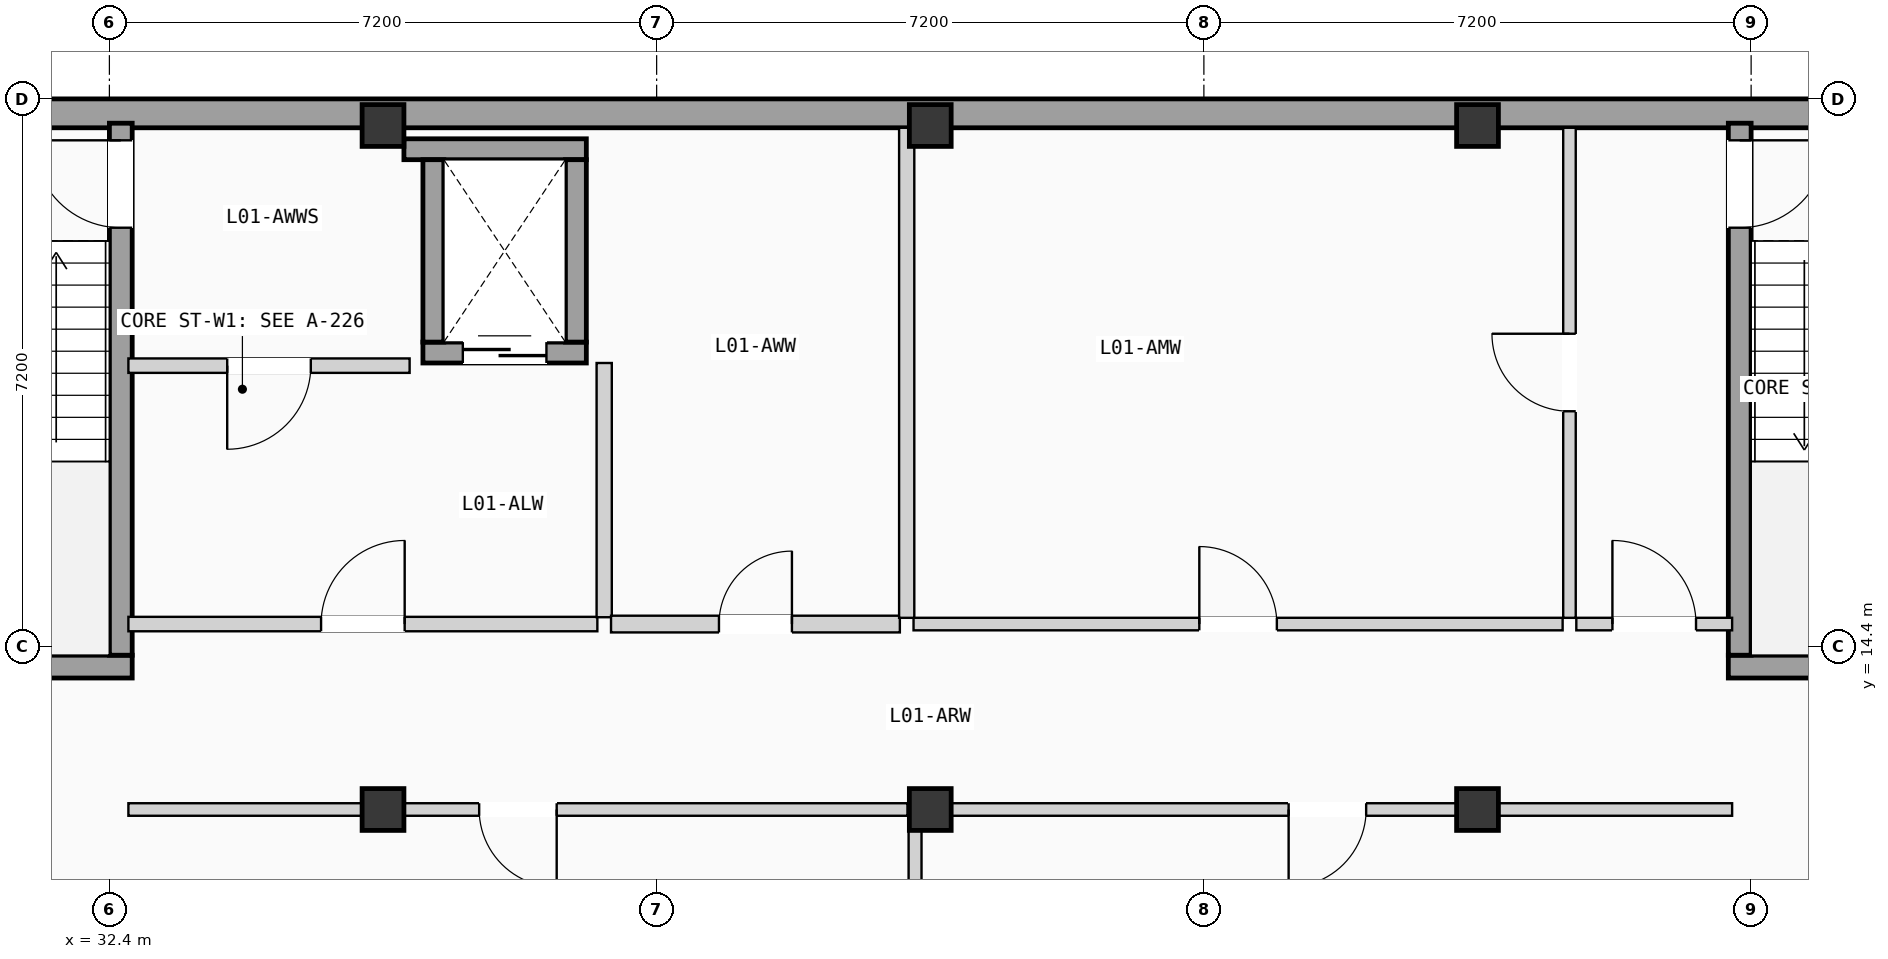
"""IFC4 building model, lengths in metres.
Left out: names, types, materials, properties, quantities, classifications, styles, units other than length and angle.
Written with IfcOpenShell. Run it as: python <this file> out.ifc"""

import sys

from ifc_helpers import new_model, si_unit, direction, frame, frame_2d, origin, origin_2d, place, context, subcontext, project, spatial, rectangle, extrude, element, fill, save


model = new_model("IFC4")
c1 = context("Model", 3, precision=1e-05, world=origin(), true_north=direction((0.0, 1.0)))
c2 = subcontext(c1, "Body", "Model", "MODEL_VIEW")
j1 = project(units=[si_unit("LENGTHUNIT", "METRE"), si_unit("PLANEANGLEUNIT", "RADIAN")], contexts=[c1])
p1 = place(None, origin())
s1 = spatial("IfcSite", under=j1, at=p1, CompositionType="ELEMENT")
p2 = place(p1, origin())
s2 = spatial("IfcBuilding", under=s1, at=p2, CompositionType="ELEMENT")
p3 = place(p2, frame((0.0, 0.0, 4.9)))
s3 = spatial("IfcBuildingStorey", under=s2, at=p3, CompositionType="ELEMENT", Elevation=4.9)
for number, where, z_axis, x_axis in (
    (1, (36.0, 12.25, 0.0), (0.0, 0.0, 1.0), (1.0, 0.0, 0.0)),
    (2, (36.0, 21.25, 0.0), (0.0, 0.0, 1.0), (1.0, 0.0, 0.0)),
    (3, (43.2, 12.25, 0.0), (0.0, 0.0, 1.0), (1.0, 0.0, 0.0)),
    (4, (43.2, 21.25, 0.0), (0.0, 0.0, 1.0), (1.0, 0.0, 0.0)),
    (5, (50.4, 12.25, 0.0), (0.0, 0.0, 1.0), (1.0, 0.0, 0.0)),
    (6, (50.4, 21.25, 0.0), (0.0, 0.0, 1.0), (1.0, 0.0, 0.0)),
):
    element("IfcColumn", number, at=place(p3, frame(where, z_axis=z_axis, x_axis=x_axis)), inside=s3, PredefinedType="COLUMN", context=c2, shape_type="SweptSolid", body=[
        extrude(rectangle(XDim=0.55, YDim=0.55, at=origin_2d()), origin(), (0.0, 0.0, 1.0), 3.675),
    ])
p4 = place(p3, frame((28.8, 21.41, 0.0), z_axis=(0.0, 0.0, 1.0), x_axis=(1.0, 0.0, 0.0)))
e7 = element("IfcWall", 7, at=p4, inside=s3, PredefinedType="SOLIDWALL", context=c2, shape_type="SweptSolid", body=[
    extrude(rectangle(XDim=28.8, YDim=0.38, at=frame_2d((14.4, 0.0))), origin(), (0.0, 0.0, 1.0), 3.4),
])
p5 = place(p3, frame((29.1, 14.13, 0.0), z_axis=(0.0, 0.0, 1.0), x_axis=(1.0, 0.0, 0.0)))
e8 = element("IfcWall", 8, at=p5, inside=s3, PredefinedType="SHEAR", context=c2, shape_type="SweptSolid", body=[
    extrude(rectangle(XDim=3.6, YDim=0.3, at=frame_2d((1.8, 0.0))), origin(), (0.0, 0.0, 1.0), 3.4),
])
p6 = place(p3, frame((32.55, 14.28, 0.0), z_axis=(0.0, 0.0, 1.0), x_axis=(0.0, 1.0, 0.0)))
e9 = element("IfcWall", 9, at=p6, inside=s3, PredefinedType="SHEAR", context=c2, shape_type="SweptSolid", body=[
    extrude(rectangle(XDim=7.0, YDim=0.3, at=frame_2d((3.5, 0.0))), origin(), (0.0, 0.0, 1.0), 3.4),
])
p7 = place(p6, frame((5.625, 0.0, 0.0)))
e10 = element("IfcOpeningElement", 10, at=p7, cuts=e9, PredefinedType="OPENING", context=c2, shape_type="SweptSolid", body=[
    extrude(rectangle(XDim=1.15, YDim=2.12, at=frame_2d((0.575, 1.06))), frame((0.0, 0.16, 0.0), z_axis=(0.0, -1.0, 0.0), x_axis=(1.0, 0.0, 0.0)), (0.0, 0.0, 1.0), 0.32),
])
p8 = place(p3, frame((53.7, 14.13, 0.0), z_axis=(0.0, 0.0, 1.0), x_axis=(1.0, 0.0, 0.0)))
e11 = element("IfcWall", 11, at=p8, inside=s3, PredefinedType="SHEAR", context=c2, shape_type="SweptSolid", body=[
    extrude(rectangle(XDim=3.6, YDim=0.3, at=frame_2d((1.8, 0.0))), origin(), (0.0, 0.0, 1.0), 3.4),
])
p9 = place(p3, frame((53.85, 14.28, 0.0), z_axis=(0.0, 0.0, 1.0), x_axis=(0.0, 1.0, 0.0)))
e12 = element("IfcWall", 12, at=p9, inside=s3, PredefinedType="SHEAR", context=c2, shape_type="SweptSolid", body=[
    extrude(rectangle(XDim=7.0, YDim=0.3, at=frame_2d((3.5, 0.0))), origin(), (0.0, 0.0, 1.0), 3.4),
])
p10 = place(p9, frame((5.625, 0.0, 0.0)))
e13 = element("IfcOpeningElement", 13, at=p10, cuts=e12, PredefinedType="OPENING", context=c2, shape_type="SweptSolid", body=[
    extrude(rectangle(XDim=1.15, YDim=2.12, at=frame_2d((0.575, 1.06))), frame((0.0, 0.16, 0.0), z_axis=(0.0, -1.0, 0.0), x_axis=(1.0, 0.0, 0.0)), (0.0, 0.0, 1.0), 0.32),
])
p11 = place(p3, frame((36.525, 18.262, 0.0), z_axis=(0.0, 0.0, 1.0), x_axis=(1.0, 0.0, 0.0)))
e14 = element("IfcWall", 14, at=p11, inside=s3, PredefinedType="SHEAR", context=c2, shape_type="SweptSolid", body=[
    extrude(rectangle(XDim=2.15, YDim=0.275, at=frame_2d((1.075, 0.0))), origin(), (0.0, 0.0, 1.0), 3.4),
])
p12 = place(p11, frame((0.525, 0.0, 0.0)))
e15 = element("IfcOpeningElement", 15, at=p12, cuts=e14, PredefinedType="OPENING", context=c2, shape_type="SweptSolid", body=[
    extrude(rectangle(XDim=1.1, YDim=2.15, at=frame_2d((0.55, 1.075))), frame((0.0, 0.147, 0.0), z_axis=(0.0, -1.0, 0.0), x_axis=(1.0, 0.0, 0.0)), (0.0, 0.0, 1.0), 0.295),
])
for number, where, z_axis, x_axis in (
    (16, (36.275, 20.938, 0.0), (0.0, 0.0, 1.0), (1.0, 0.0, 0.0)),
    (17, (36.663, 18.4, 0.0), (0.0, 0.0, 1.0), (0.0, 1.0, 0.0)),
    (18, (38.538, 18.4, 0.0), (0.0, 0.0, 1.0), (0.0, 1.0, 0.0)),
):
    element("IfcWall", number, at=place(p3, frame(where, z_axis=z_axis, x_axis=x_axis)), inside=s3, PredefinedType="SHEAR", context=c2, shape_type="SweptSolid", body=[
        extrude(rectangle(XDim=2.4, YDim=0.275, at=frame_2d((1.2, 0.0))), origin(), (0.0, 0.0, 1.0), 3.4),
    ])
p13 = place(p3, frame((32.65, 18.09, 0.0), z_axis=(0.0, 0.0, 1.0), x_axis=(1.0, 0.0, 0.0)))
e19 = element("IfcWall", 19, at=p13, inside=s3, PredefinedType="PARTITIONING", context=c2, shape_type="SweptSolid", body=[
    extrude(rectangle(XDim=3.7, YDim=0.19, at=frame_2d((1.85, 0.0))), origin(), (0.0, 0.0, 1.0), 3.39),
])
p14 = place(p13, frame((1.3, 0.0, 0.0)))
e20 = element("IfcOpeningElement", 20, at=p14, cuts=e19, PredefinedType="OPENING", context=c2, shape_type="SweptSolid", body=[
    extrude(rectangle(XDim=1.1, YDim=2.12, at=frame_2d((0.55, 1.06))), frame((0.0, 0.105, 0.0), z_axis=(0.0, -1.0, 0.0), x_axis=(1.0, 0.0, 0.0)), (0.0, 0.0, 1.0), 0.21),
])
p15 = place(p3, frame((32.65, 14.69, 0.0), z_axis=(0.0, 0.0, 1.0), x_axis=(1.0, 0.0, 0.0)))
e21 = element("IfcWall", 21, at=p15, inside=s3, PredefinedType="PARTITIONING", context=c2, shape_type="SweptSolid", body=[
    extrude(rectangle(XDim=6.17, YDim=0.19, at=frame_2d((3.085, 0.0))), origin(), (0.0, 0.0, 1.0), 3.39),
])
p16 = place(p15, frame((2.535, 0.0, 0.0)))
e22 = element("IfcOpeningElement", 22, at=p16, cuts=e21, PredefinedType="OPENING", context=c2, shape_type="SweptSolid", body=[
    extrude(rectangle(XDim=1.1, YDim=2.12, at=frame_2d((0.55, 1.06))), frame((0.0, 0.105, 0.0), z_axis=(0.0, -1.0, 0.0), x_axis=(1.0, 0.0, 0.0)), (0.0, 0.0, 1.0), 0.21),
])
p17 = place(p3, frame((38.91, 14.78, 0.0), z_axis=(0.0, 0.0, 1.0), x_axis=(0.0, 1.0, 0.0)))
e23 = element("IfcWall", 23, at=p17, inside=s3, PredefinedType="PLUMBINGWALL", context=c2, shape_type="SweptSolid", body=[
    extrude(rectangle(XDim=3.345, YDim=0.2, at=frame_2d((1.672, 0.0))), origin(), (0.0, 0.0, 1.0), 3.39),
])
p18 = place(p3, frame((51.7, 14.69, 0.0), z_axis=(0.0, 0.0, 1.0), x_axis=(1.0, 0.0, 0.0)))
e24 = element("IfcWall", 24, at=p18, inside=s3, PredefinedType="PARTITIONING", context=c2, shape_type="SweptSolid", body=[
    extrude(rectangle(XDim=2.05, YDim=0.165, at=frame_2d((1.025, 0.0))), origin(), (0.0, 0.0, 1.0), 3.39),
])
p19 = place(p18, frame((0.475, 0.0, 0.0)))
e25 = element("IfcOpeningElement", 25, at=p19, cuts=e24, PredefinedType="OPENING", context=c2, shape_type="SweptSolid", body=[
    extrude(rectangle(XDim=1.1, YDim=2.12, at=frame_2d((0.55, 1.06))), frame((0.0, 0.093, 0.0), z_axis=(0.0, -1.0, 0.0), x_axis=(1.0, 0.0, 0.0)), (0.0, 0.0, 1.0), 0.185),
])
p20 = place(p3, frame((32.65, 12.25, 0.0), z_axis=(0.0, 0.0, 1.0), x_axis=(1.0, 0.0, 0.0)))
e26 = element("IfcWall", 26, at=p20, inside=s3, PredefinedType="PARTITIONING", context=c2, shape_type="SweptSolid", body=[
    extrude(rectangle(XDim=10.25, YDim=0.165, at=frame_2d((5.125, 0.0))), origin(), (0.0, 0.0, 1.0), 2.72),
])
p21 = place(p20, frame((4.615, 0.0, 0.0)))
e27 = element("IfcOpeningElement", 27, at=p21, cuts=e26, PredefinedType="OPENING", context=c2, shape_type="SweptSolid", body=[
    extrude(rectangle(XDim=1.02, YDim=2.16, at=frame_2d((0.51, 1.08))), frame((0.0, 0.093, 0.0), z_axis=(0.0, -1.0, 0.0), x_axis=(1.0, 0.0, 0.0)), (0.0, 0.0, 1.0), 0.185),
])
p22 = place(p3, frame((43.1, 12.25, 0.0), z_axis=(0.0, 0.0, 1.0), x_axis=(1.0, 0.0, 0.0)))
e28 = element("IfcWall", 28, at=p22, inside=s3, PredefinedType="PARTITIONING", context=c2, shape_type="SweptSolid", body=[
    extrude(rectangle(XDim=10.65, YDim=0.165, at=frame_2d((5.325, 0.0))), origin(), (0.0, 0.0, 1.0), 2.72),
])
p23 = place(p22, frame((4.815, 0.0, 0.0)))
e29 = element("IfcOpeningElement", 29, at=p23, cuts=e28, PredefinedType="OPENING", context=c2, shape_type="SweptSolid", body=[
    extrude(rectangle(XDim=1.02, YDim=2.16, at=frame_2d((0.51, 1.08))), frame((0.0, 0.093, 0.0), z_axis=(0.0, -1.0, 0.0), x_axis=(1.0, 0.0, 0.0)), (0.0, 0.0, 1.0), 0.185),
])
p24 = place(p3, frame((39.0, 14.69, 0.0), z_axis=(0.0, 0.0, 1.0), x_axis=(1.0, 0.0, 0.0)))
e30 = element("IfcWall", 30, at=p24, inside=s3, PredefinedType="PLUMBINGWALL", context=c2, shape_type="SweptSolid", body=[
    extrude(rectangle(XDim=3.8, YDim=0.22, at=frame_2d((1.9, 0.0))), origin(), (0.0, 0.0, 1.0), 3.39),
])
p25 = place(p24, frame((1.42, 0.0, 0.0)))
e31 = element("IfcOpeningElement", 31, at=p25, cuts=e30, PredefinedType="OPENING", context=c2, shape_type="SweptSolid", body=[
    extrude(rectangle(XDim=0.96, YDim=2.05, at=frame_2d((0.48, 1.025))), frame((0.0, 0.12, 0.0), z_axis=(0.0, -1.0, 0.0), x_axis=(1.0, 0.0, 0.0)), (0.0, 0.0, 1.0), 0.24),
])
p26 = place(p3, frame((42.98, 14.69, 0.0), z_axis=(0.0, 0.0, 1.0), x_axis=(1.0, 0.0, 0.0)))
e32 = element("IfcWall", 32, at=p26, inside=s3, PredefinedType="PARTITIONING", context=c2, shape_type="SweptSolid", body=[
    extrude(rectangle(XDim=8.54, YDim=0.165, at=frame_2d((4.27, 0.0))), origin(), (0.0, 0.0, 1.0), 3.39),
])
p27 = place(p26, frame((3.76, 0.0, 0.0)))
e33 = element("IfcOpeningElement", 33, at=p27, cuts=e32, PredefinedType="OPENING", context=c2, shape_type="SweptSolid", body=[
    extrude(rectangle(XDim=1.02, YDim=2.16, at=frame_2d((0.51, 1.08))), frame((0.0, 0.093, 0.0), z_axis=(0.0, -1.0, 0.0), x_axis=(1.0, 0.0, 0.0)), (0.0, 0.0, 1.0), 0.185),
])
p28 = place(p3, frame((51.61, 14.772, 0.0), z_axis=(0.0, 0.0, 1.0), x_axis=(0.0, 1.0, 0.0)))
e34 = element("IfcWall", 34, at=p28, inside=s3, PredefinedType="PARTITIONING", context=c2, shape_type="SweptSolid", body=[
    extrude(rectangle(XDim=6.448, YDim=0.165, at=frame_2d((3.224, 0.0))), origin(), (0.0, 0.0, 1.0), 3.39),
])
p29 = place(p28, frame((2.718, 0.0, 0.0)))
e35 = element("IfcOpeningElement", 35, at=p29, cuts=e34, PredefinedType="OPENING", context=c2, shape_type="SweptSolid", body=[
    extrude(rectangle(XDim=1.02, YDim=2.16, at=frame_2d((0.51, 1.08))), frame((0.0, 0.093, 0.0), z_axis=(0.0, -1.0, 0.0), x_axis=(1.0, 0.0, 0.0)), (0.0, 0.0, 1.0), 0.185),
])
p30 = place(p3, frame((43.0, 0.38, 0.0), z_axis=(0.0, 0.0, 1.0), x_axis=(0.0, 1.0, 0.0)))
e36 = element("IfcWall", 36, at=p30, inside=s3, PredefinedType="PARTITIONING", context=c2, shape_type="SweptSolid", body=[
    extrude(rectangle(XDim=11.788, YDim=0.17, at=frame_2d((5.894, 0.0))), origin(), (0.0, 0.0, 1.0), 2.77),
])
p31 = place(p3, frame((42.89, 14.772, 0.0), z_axis=(0.0, 0.0, 1.0), x_axis=(0.0, 1.0, 0.0)))
e37 = element("IfcWall", 37, at=p31, inside=s3, PredefinedType="PLUMBINGWALL", context=c2, shape_type="SweptSolid", body=[
    extrude(rectangle(XDim=6.448, YDim=0.2, at=frame_2d((3.224, 0.0))), origin(), (0.0, 0.0, 1.0), 2.77),
])
p32 = place(p7, origin())
e38 = element("IfcDoor", 38, at=p32, inside=s3, OperationType="SINGLE_SWING_RIGHT", PredefinedType="DOOR", context=c2, shape_type="SweptSolid", body=[
    extrude(rectangle(XDim=1.15, YDim=2.12, at=frame_2d((0.575, 1.06))), frame((0.0, 0.025, 0.0), z_axis=(0.0, -1.0, 0.0), x_axis=(1.0, 0.0, 0.0)), (0.0, 0.0, 1.0), 0.05),
])
fill(e10, e38)
p33 = place(p10, frame((1.15, 0.0, 0.0), z_axis=(0.0, 0.0, 1.0), x_axis=(-1.0, 0.0, 0.0)))
e39 = element("IfcDoor", 39, at=p33, inside=s3, OperationType="SINGLE_SWING_RIGHT", PredefinedType="DOOR", context=c2, shape_type="SweptSolid", body=[
    extrude(rectangle(XDim=1.15, YDim=2.12, at=frame_2d((0.575, 1.06))), frame((0.0, 0.025, 0.0), z_axis=(0.0, -1.0, 0.0), x_axis=(1.0, 0.0, 0.0)), (0.0, 0.0, 1.0), 0.05),
])
fill(e13, e39)
p34 = place(p12, origin())
e40 = element("IfcDoor", 40, at=p34, inside=s3, OperationType="SLIDING_TO_LEFT", PredefinedType="DOOR", context=c2, shape_type="SweptSolid", body=[
    extrude(rectangle(XDim=1.1, YDim=2.15, at=frame_2d((0.55, 1.075))), frame((0.0, 0.025, 0.0), z_axis=(0.0, -1.0, 0.0), x_axis=(1.0, 0.0, 0.0)), (0.0, 0.0, 1.0), 0.05),
])
fill(e15, e40)
p35 = place(p14, frame((1.1, 0.0, 0.0), z_axis=(0.0, 0.0, 1.0), x_axis=(-1.0, 0.0, 0.0)))
e41 = element("IfcDoor", 41, at=p35, inside=s3, OperationType="SINGLE_SWING_LEFT", PredefinedType="DOOR", context=c2, shape_type="SweptSolid", body=[
    extrude(rectangle(XDim=1.1, YDim=2.12, at=frame_2d((0.55, 1.06))), frame((0.0, 0.025, 0.0), z_axis=(0.0, -1.0, 0.0), x_axis=(1.0, 0.0, 0.0)), (0.0, 0.0, 1.0), 0.05),
])
fill(e20, e41)
p36 = place(p16, origin())
e42 = element("IfcDoor", 42, at=p36, inside=s3, OperationType="SINGLE_SWING_RIGHT", PredefinedType="DOOR", context=c2, shape_type="SweptSolid", body=[
    extrude(rectangle(XDim=1.1, YDim=2.12, at=frame_2d((0.55, 1.06))), frame((0.0, 0.025, 0.0), z_axis=(0.0, -1.0, 0.0), x_axis=(1.0, 0.0, 0.0)), (0.0, 0.0, 1.0), 0.05),
])
fill(e22, e42)
p37 = place(p19, origin())
e43 = element("IfcDoor", 43, at=p37, inside=s3, OperationType="SINGLE_SWING_LEFT", PredefinedType="DOOR", context=c2, shape_type="SweptSolid", body=[
    extrude(rectangle(XDim=1.1, YDim=2.12, at=frame_2d((0.55, 1.06))), frame((0.0, 0.025, 0.0), z_axis=(0.0, -1.0, 0.0), x_axis=(1.0, 0.0, 0.0)), (0.0, 0.0, 1.0), 0.05),
])
fill(e25, e43)
p38 = place(p21, frame((1.02, 0.0, 0.0), z_axis=(0.0, 0.0, 1.0), x_axis=(-1.0, 0.0, 0.0)))
e44 = element("IfcDoor", 44, at=p38, inside=s3, OperationType="SINGLE_SWING_RIGHT", PredefinedType="DOOR", context=c2, shape_type="SweptSolid", body=[
    extrude(rectangle(XDim=1.02, YDim=2.16, at=frame_2d((0.51, 1.08))), frame((0.0, 0.025, 0.0), z_axis=(0.0, -1.0, 0.0), x_axis=(1.0, 0.0, 0.0)), (0.0, 0.0, 1.0), 0.05),
])
fill(e27, e44)
p39 = place(p23, frame((1.02, 0.0, 0.0), z_axis=(0.0, 0.0, 1.0), x_axis=(-1.0, 0.0, 0.0)))
e45 = element("IfcDoor", 45, at=p39, inside=s3, OperationType="SINGLE_SWING_LEFT", PredefinedType="DOOR", context=c2, shape_type="SweptSolid", body=[
    extrude(rectangle(XDim=1.02, YDim=2.16, at=frame_2d((0.51, 1.08))), frame((0.0, 0.025, 0.0), z_axis=(0.0, -1.0, 0.0), x_axis=(1.0, 0.0, 0.0)), (0.0, 0.0, 1.0), 0.05),
])
fill(e29, e45)
p40 = place(p25, origin())
e46 = element("IfcDoor", 46, at=p40, inside=s3, OperationType="SINGLE_SWING_RIGHT", PredefinedType="DOOR", context=c2, shape_type="SweptSolid", body=[
    extrude(rectangle(XDim=0.96, YDim=2.05, at=frame_2d((0.48, 1.025))), frame((0.0, 0.025, 0.0), z_axis=(0.0, -1.0, 0.0), x_axis=(1.0, 0.0, 0.0)), (0.0, 0.0, 1.0), 0.05),
])
fill(e31, e46)
p41 = place(p27, origin())
e47 = element("IfcDoor", 47, at=p41, inside=s3, OperationType="SINGLE_SWING_LEFT", PredefinedType="DOOR", context=c2, shape_type="SweptSolid", body=[
    extrude(rectangle(XDim=1.02, YDim=2.16, at=frame_2d((0.51, 1.08))), frame((0.0, 0.025, 0.0), z_axis=(0.0, -1.0, 0.0), x_axis=(1.0, 0.0, 0.0)), (0.0, 0.0, 1.0), 0.05),
])
fill(e33, e47)
p42 = place(p29, origin())
e48 = element("IfcDoor", 48, at=p42, inside=s3, OperationType="SINGLE_SWING_RIGHT", PredefinedType="DOOR", context=c2, shape_type="SweptSolid", body=[
    extrude(rectangle(XDim=1.02, YDim=2.16, at=frame_2d((0.51, 1.08))), frame((0.0, 0.025, 0.0), z_axis=(0.0, -1.0, 0.0), x_axis=(1.0, 0.0, 0.0)), (0.0, 0.0, 1.0), 0.05),
])
fill(e35, e48)
save(model, sys.argv[1])
